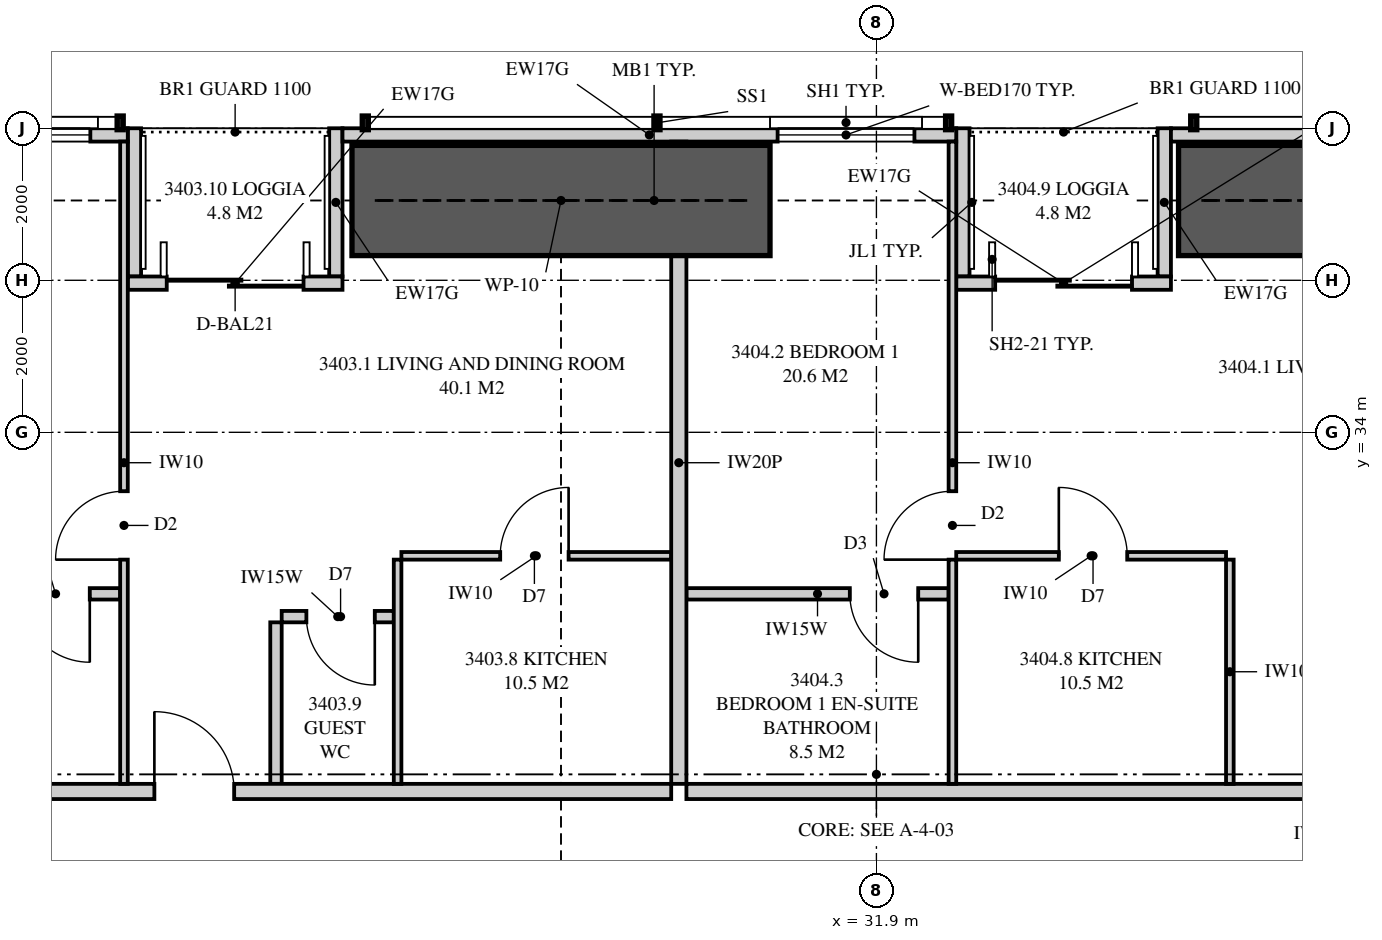
"""IFC4 building model, lengths in metres.
Left out: names, types, materials, properties, quantities, classifications, styles, units other than length and angle.
Written with IfcOpenShell. Run it as: python <this file> out.ifc"""

import sys

from ifc_helpers import new_model, si_unit, direction, frame, frame_2d, origin, place, context, subcontext, project, spatial, polyline, rectangle, outline, extrude, element, fill, save


model = new_model("IFC4")
c1 = context("Model", 3, precision=1e-05, world=origin(), true_north=direction((0.0, 1.0)))
c2 = subcontext(c1, "Body", "Model", "MODEL_VIEW")
j1 = project(units=[si_unit("LENGTHUNIT", "METRE"), si_unit("PLANEANGLEUNIT", "RADIAN")], contexts=[c1])
p1 = place(None, origin())
s1 = spatial("IfcSite", under=j1, at=p1, CompositionType="ELEMENT")
p2 = place(p1, origin())
s2 = spatial("IfcBuilding", under=s1, at=p2, CompositionType="ELEMENT")
p3 = place(p2, frame((0.0, 0.0, 124.95)))
s3 = spatial("IfcBuildingStorey", under=s2, at=p3, CompositionType="ELEMENT", Elevation=124.95)
p4 = place(p3, frame((46.449, 37.913, 0.0), z_axis=(0.0, 0.0, 1.0), x_axis=(-1.0, 0.0, 0.0)))
e1 = element("IfcWall", 1, at=p4, inside=s3, PredefinedType="SOLIDWALL", context=c2, shape_type="SweptSolid", body=[
    extrude(outline(polyline([(0.0, 0.0), (10.674, 0.0), (10.674, 2.15), (7.824, 2.15), (7.824, 3.11), (7.666, 3.11), (7.666, 2.15), (7.62, 2.15), (7.62, 3.11), (0.0, 3.11), (0.0, 0.0)])), frame((0.0, 0.087, 0.0), z_axis=(0.0, -1.0, 0.0), x_axis=(1.0, 0.0, 0.0)), (0.0, 0.0, 1.0), 0.175),
])
p5 = place(p4, frame((2.399, 0.0, 0.4)))
e2 = element("IfcOpeningElement", 2, at=p5, cuts=e1, PredefinedType="OPENING", context=c2, shape_type="SweptSolid", body=[
    extrude(rectangle(XDim=1.8, YDim=1.7, at=frame_2d((0.9, 0.85))), frame((0.0, 0.097, 0.0), z_axis=(0.0, -1.0, 0.0), x_axis=(1.0, 0.0, 0.0)), (0.0, 0.0, 1.0), 0.195),
])
p6 = place(p3, frame((32.95, 37.913, 0.0), z_axis=(0.0, 0.0, 1.0), x_axis=(-1.0, 0.0, 0.0)))
e3 = element("IfcWall", 3, at=p6, inside=s3, PredefinedType="SOLIDWALL", context=c2, shape_type="SweptSolid", body=[
    extrude(rectangle(XDim=8.075, YDim=0.175, at=frame_2d((4.038, 0.0))), origin(), (0.0, 0.0, 1.0), 2.15),
])
p7 = place(p6, frame((0.55, 0.0, 0.4)))
e4 = element("IfcOpeningElement", 4, at=p7, cuts=e3, PredefinedType="OPENING", context=c2, shape_type="SweptSolid", body=[
    extrude(rectangle(XDim=1.8, YDim=1.7, at=frame_2d((0.9, 0.85))), frame((0.0, 0.097, 0.0), z_axis=(0.0, -1.0, 0.0), x_axis=(1.0, 0.0, 0.0)), (0.0, 0.0, 1.0), 0.195),
])
p8 = place(p3, frame((22.05, 37.913, 0.0), z_axis=(0.0, 0.0, 1.0), x_axis=(-1.0, 0.0, 0.0)))
e5 = element("IfcWall", 5, at=p8, inside=s3, PredefinedType="SOLIDWALL", context=c2, shape_type="SweptSolid", body=[
    extrude(outline(polyline([(0.0, 0.0), (12.999, 0.0), (12.999, 3.11), (5.378, 3.11), (5.378, 2.15), (5.333, 2.15), (5.333, 3.11), (5.175, 3.11), (5.175, 2.15), (0.0, 2.15), (0.0, 0.0)])), frame((0.0, 0.087, 0.0), z_axis=(0.0, -1.0, 0.0), x_axis=(1.0, 0.0, 0.0)), (0.0, 0.0, 1.0), 0.175),
])
p9 = place(p8, frame((0.492, 0.0, 0.4)))
e6 = element("IfcOpeningElement", 6, at=p9, cuts=e5, PredefinedType="OPENING", context=c2, shape_type="SweptSolid", body=[
    extrude(rectangle(XDim=1.8, YDim=1.7, at=frame_2d((0.9, 0.85))), frame((0.0, 0.097, 0.0), z_axis=(0.0, -1.0, 0.0), x_axis=(1.0, 0.0, 0.0)), (0.0, 0.0, 1.0), 0.195),
])
p10 = place(p8, frame((8.065, 0.0, 0.4)))
e7 = element("IfcOpeningElement", 7, at=p10, cuts=e5, PredefinedType="OPENING", context=c2, shape_type="SweptSolid", body=[
    extrude(rectangle(XDim=1.8, YDim=1.7, at=frame_2d((0.9, 0.85))), frame((0.0, 0.097, 0.0), z_axis=(0.0, -1.0, 0.0), x_axis=(1.0, 0.0, 0.0)), (0.0, 0.0, 1.0), 0.195),
])
p11 = place(p3, frame((35.775, 35.962, 0.0), z_axis=(0.0, 0.0, 1.0), x_axis=(-1.0, 0.0, 0.0)))
e8 = element("IfcWall", 8, at=p11, inside=s3, PredefinedType="SOLIDWALL", context=c2, shape_type="SweptSolid", body=[
    extrude(rectangle(XDim=2.825, YDim=0.175, at=frame_2d((1.413, 0.0))), origin(), (0.0, 0.0, 1.0), 3.11),
])
p12 = place(p11, frame((0.512, 0.0, 0.0)))
e9 = element("IfcOpeningElement", 9, at=p12, cuts=e8, PredefinedType="OPENING", context=c2, shape_type="SweptSolid", body=[
    extrude(rectangle(XDim=1.8, YDim=2.1, at=frame_2d((0.9, 1.05))), frame((0.0, 0.097, 0.0), z_axis=(0.0, -1.0, 0.0), x_axis=(1.0, 0.0, 0.0)), (0.0, 0.0, 1.0), 0.195),
])
for number, where, z_axis, x_axis in (
    (10, (35.688, 38.0, 0.0), (0.0, 0.0, 1.0), (0.0, -1.0, 0.0)),
    (11, (33.038, 38.0, 0.0), (0.0, 0.0, 1.0), (0.0, -1.0, 0.0)),
):
    element("IfcWall", number, at=place(p3, frame(where, z_axis=z_axis, x_axis=x_axis)), inside=s3, PredefinedType="SOLIDWALL", context=c2, shape_type="SweptSolid", body=[
        extrude(outline(polyline([(0.0, 0.0), (1.95, 0.0), (1.95, 3.11), (1.75, 3.11), (1.75, 2.15), (0.15, 2.15), (0.15, 3.11), (0.0, 3.11), (0.0, 0.0)])), frame((0.0, 0.087, 0.0), z_axis=(0.0, -1.0, 0.0), x_axis=(1.0, 0.0, 0.0)), (0.0, 0.0, 1.0), 0.175),
    ])
p13 = place(p3, frame((24.875, 35.962, 0.0), z_axis=(0.0, 0.0, 1.0), x_axis=(-1.0, 0.0, 0.0)))
e12 = element("IfcWall", 12, at=p13, inside=s3, PredefinedType="SOLIDWALL", context=c2, shape_type="SweptSolid", body=[
    extrude(rectangle(XDim=2.825, YDim=0.175, at=frame_2d((1.413, 0.0))), origin(), (0.0, 0.0, 1.0), 3.11),
])
p14 = place(p13, frame((0.512, 0.0, 0.0)))
e13 = element("IfcOpeningElement", 13, at=p14, cuts=e12, PredefinedType="OPENING", context=c2, shape_type="SweptSolid", body=[
    extrude(rectangle(XDim=1.8, YDim=2.1, at=frame_2d((0.9, 1.05))), frame((0.0, 0.097, 0.0), z_axis=(0.0, -1.0, 0.0), x_axis=(1.0, 0.0, 0.0)), (0.0, 0.0, 1.0), 0.195),
])
for number, where, z_axis, x_axis in (
    (14, (24.788, 38.0, 0.0), (0.0, 0.0, 1.0), (0.0, -1.0, 0.0)),
    (15, (22.137, 38.0, 0.0), (0.0, 0.0, 1.0), (0.0, -1.0, 0.0)),
):
    element("IfcWall", number, at=place(p3, frame(where, z_axis=z_axis, x_axis=x_axis)), inside=s3, PredefinedType="SOLIDWALL", context=c2, shape_type="SweptSolid", body=[
        extrude(outline(polyline([(0.0, 0.0), (1.95, 0.0), (1.95, 3.11), (1.75, 3.11), (1.75, 2.15), (0.15, 2.15), (0.15, 3.11), (0.0, 3.11), (0.0, 0.0)])), frame((0.0, 0.087, 0.0), z_axis=(0.0, -1.0, 0.0), x_axis=(1.0, 0.0, 0.0)), (0.0, 0.0, 1.0), 0.175),
    ])
p15 = place(p3, frame((29.3, 37.825, 0.0), z_axis=(0.0, 0.0, 1.0), x_axis=(0.0, -1.0, 0.0)))
e16 = element("IfcWall", 16, at=p15, inside=s3, PredefinedType="PARTITIONING", context=c2, shape_type="SweptSolid", body=[
    extrude(outline(polyline([(0.529, 2.15), (0.0, 2.15), (0.0, 0.0), (0.529, 0.0), (0.529, 0.444), (1.021, 0.444), (1.021, 0.0), (8.45, 0.0), (8.45, 3.11), (1.685, 3.11), (1.685, 2.15), (1.021, 2.15), (1.021, 1.706), (0.529, 1.706), (0.529, 2.15)])), frame((0.0, 0.1, 0.0), z_axis=(0.0, -1.0, 0.0), x_axis=(1.0, 0.0, 0.0)), (0.0, 0.0, 1.0), 0.2),
])
p16 = place(p3, frame((17.775, 29.275, 0.0), z_axis=(0.0, 0.0, 1.0), x_axis=(1.0, 0.0, 0.0)))
e17 = element("IfcWall", 17, at=p16, inside=s3, PredefinedType="PARTITIONING", context=c2, shape_type="SweptSolid", body=[
    extrude(outline(polyline([(0.0, 0.0), (11.425, 0.0), (11.425, 3.11), (10.312, 3.11), (10.312, 2.541), (9.638, 2.541), (9.638, 3.11), (0.0, 3.11), (0.0, 0.0)])), frame((0.0, 0.1, 0.0), z_axis=(0.0, -1.0, 0.0), x_axis=(1.0, 0.0, 0.0)), (0.0, 0.0, 1.0), 0.2),
])
p17 = place(p16, frame((4.625, 0.0, 0.0)))
e18 = element("IfcOpeningElement", 18, at=p17, cuts=e17, PredefinedType="OPENING", context=c2, shape_type="SweptSolid", body=[
    extrude(rectangle(XDim=1.05, YDim=2.2, at=frame_2d((0.525, 1.1))), frame((0.0, 0.11, 0.0), z_axis=(0.0, -1.0, 0.0), x_axis=(1.0, 0.0, 0.0)), (0.0, 0.0, 1.0), 0.22),
])
p18 = place(p3, frame((22.0, 37.825, 0.0), z_axis=(0.0, 0.0, 1.0), x_axis=(0.0, -1.0, 0.0)))
e19 = element("IfcWall", 19, at=p18, inside=s3, PredefinedType="PARTITIONING", context=c2, shape_type="SweptSolid", body=[
    extrude(outline(polyline([(0.0, 0.0), (8.45, 0.0), (8.45, 3.11), (1.635, 3.11), (1.635, 2.15), (0.0, 2.15), (0.0, 3.11), (0.0, 0.0)])), frame((0.0, 0.05, 0.0), z_axis=(0.0, -1.0, 0.0), x_axis=(1.0, 0.0, 0.0)), (0.0, 0.0, 1.0), 0.1),
])
p19 = place(p18, frame((4.6, 0.0, 0.0)))
e20 = element("IfcOpeningElement", 20, at=p19, cuts=e19, PredefinedType="OPENING", context=c2, shape_type="SweptSolid", body=[
    extrude(rectangle(XDim=0.9, YDim=2.1, at=frame_2d((0.45, 1.05))), frame((0.0, 0.06, 0.0), z_axis=(0.0, -1.0, 0.0), x_axis=(1.0, 0.0, 0.0)), (0.0, 0.0, 1.0), 0.12),
])
p20 = place(p3, frame((17.75, 31.875, 0.0), z_axis=(0.0, 0.0, 1.0), x_axis=(1.0, 0.0, 0.0)))
e21 = element("IfcWall", 21, at=p20, inside=s3, PredefinedType="PLUMBINGWALL", context=c2, shape_type="SweptSolid", body=[
    extrude(rectangle(XDim=4.2, YDim=0.15, at=frame_2d((2.1, 0.0))), origin(), (0.0, 0.0, 1.0), 3.11),
])
p21 = place(p20, frame((2.9, 0.0, 0.0)))
e22 = element("IfcOpeningElement", 22, at=p21, cuts=e21, PredefinedType="OPENING", context=c2, shape_type="SweptSolid", body=[
    extrude(rectangle(XDim=0.9, YDim=2.1, at=frame_2d((0.45, 1.05))), frame((0.0, 0.085, 0.0), z_axis=(0.0, -1.0, 0.0), x_axis=(1.0, 0.0, 0.0)), (0.0, 0.0, 1.0), 0.17),
])
p22 = place(p3, frame((25.65, 32.375, 0.0), z_axis=(0.0, 0.0, 1.0), x_axis=(1.0, 0.0, 0.0)))
e23 = element("IfcWall", 23, at=p22, inside=s3, PredefinedType="PARTITIONING", context=c2, shape_type="SweptSolid", body=[
    extrude(outline(polyline([(0.0, 0.0), (3.55, 0.0), (3.55, 3.11), (2.387, 3.11), (2.387, 2.541), (1.812, 2.541), (1.812, 3.11), (0.0, 3.11), (0.0, 0.0)])), frame((0.0, 0.05, 0.0), z_axis=(0.0, -1.0, 0.0), x_axis=(1.0, 0.0, 0.0)), (0.0, 0.0, 1.0), 0.1),
])
p23 = place(p22, frame((1.3, 0.0, 0.0)))
e24 = element("IfcOpeningElement", 24, at=p23, cuts=e23, PredefinedType="OPENING", context=c2, shape_type="SweptSolid", body=[
    extrude(rectangle(XDim=0.9, YDim=2.1, at=frame_2d((0.45, 1.05))), frame((0.0, 0.06, 0.0), z_axis=(0.0, -1.0, 0.0), x_axis=(1.0, 0.0, 0.0)), (0.0, 0.0, 1.0), 0.12),
])
p24 = place(p3, frame((25.6, 32.325, 0.0), z_axis=(0.0, 0.0, 1.0), x_axis=(0.0, -1.0, 0.0)))
e25 = element("IfcWall", 25, at=p24, inside=s3, PredefinedType="PARTITIONING", context=c2, shape_type="SweptSolid", body=[
    extrude(rectangle(XDim=2.95, YDim=0.1, at=frame_2d((1.475, 0.0))), origin(), (0.0, 0.0, 1.0), 3.11),
])
p25 = place(p3, frame((24.075, 31.575, 0.0), z_axis=(0.0, 0.0, 1.0), x_axis=(1.0, 0.0, 0.0)))
e26 = element("IfcWall", 26, at=p25, inside=s3, PredefinedType="PLUMBINGWALL", context=c2, shape_type="SweptSolid", body=[
    extrude(rectangle(XDim=1.475, YDim=0.15, at=frame_2d((0.738, 0.0))), origin(), (0.0, 0.0, 1.0), 3.11),
])
p26 = place(p25, frame((0.325, 0.0, 0.0)))
e27 = element("IfcOpeningElement", 27, at=p26, cuts=e26, PredefinedType="OPENING", context=c2, shape_type="SweptSolid", body=[
    extrude(rectangle(XDim=0.9, YDim=2.1, at=frame_2d((0.45, 1.05))), frame((0.0, 0.085, 0.0), z_axis=(0.0, -1.0, 0.0), x_axis=(1.0, 0.0, 0.0)), (0.0, 0.0, 1.0), 0.17),
])
p27 = place(p3, frame((24.0, 31.5, 0.0), z_axis=(0.0, 0.0, 1.0), x_axis=(0.0, -1.0, 0.0)))
e28 = element("IfcWall", 28, at=p27, inside=s3, PredefinedType="PLUMBINGWALL", context=c2, shape_type="SweptSolid", body=[
    extrude(rectangle(XDim=2.125, YDim=0.15, at=frame_2d((1.062, 0.0))), origin(), (0.0, 0.0, 1.0), 3.11),
])
p28 = place(p3, frame((29.4, 29.275, 0.0), z_axis=(0.0, 0.0, 1.0), x_axis=(1.0, 0.0, 0.0)))
e29 = element("IfcWall", 29, at=p28, inside=s3, PredefinedType="PARTITIONING", context=c2, shape_type="SweptSolid", body=[
    extrude(rectangle(XDim=8.6, YDim=0.2, at=frame_2d((4.3, 0.0))), origin(), (0.0, 0.0, 1.0), 3.11),
])
p29 = place(p3, frame((32.9, 37.825, 0.0), z_axis=(0.0, 0.0, 1.0), x_axis=(0.0, -1.0, 0.0)))
e30 = element("IfcWall", 30, at=p29, inside=s3, PredefinedType="PARTITIONING", context=c2, shape_type="SweptSolid", body=[
    extrude(outline(polyline([(0.0, 0.0), (8.45, 0.0), (8.45, 3.11), (1.635, 3.11), (1.635, 2.15), (0.0, 2.15), (0.0, 3.11), (0.0, 0.0)])), frame((0.0, 0.05, 0.0), z_axis=(0.0, -1.0, 0.0), x_axis=(1.0, 0.0, 0.0)), (0.0, 0.0, 1.0), 0.1),
])
p30 = place(p29, frame((4.6, 0.0, 0.0)))
e31 = element("IfcOpeningElement", 31, at=p30, cuts=e30, PredefinedType="OPENING", context=c2, shape_type="SweptSolid", body=[
    extrude(rectangle(XDim=0.9, YDim=2.1, at=frame_2d((0.45, 1.05))), frame((0.0, 0.06, 0.0), z_axis=(0.0, -1.0, 0.0), x_axis=(1.0, 0.0, 0.0)), (0.0, 0.0, 1.0), 0.12),
])
p31 = place(p3, frame((29.4, 31.875, 0.0), z_axis=(0.0, 0.0, 1.0), x_axis=(1.0, 0.0, 0.0)))
e32 = element("IfcWall", 32, at=p31, inside=s3, PredefinedType="PLUMBINGWALL", context=c2, shape_type="SweptSolid", body=[
    extrude(rectangle(XDim=3.45, YDim=0.15, at=frame_2d((1.725, 0.0))), origin(), (0.0, 0.0, 1.0), 3.11),
])
p32 = place(p31, frame((2.15, 0.0, 0.0)))
e33 = element("IfcOpeningElement", 33, at=p32, cuts=e32, PredefinedType="OPENING", context=c2, shape_type="SweptSolid", body=[
    extrude(rectangle(XDim=0.9, YDim=2.1, at=frame_2d((0.45, 1.05))), frame((0.0, 0.085, 0.0), z_axis=(0.0, -1.0, 0.0), x_axis=(1.0, 0.0, 0.0)), (0.0, 0.0, 1.0), 0.17),
])
p33 = place(p3, frame((32.95, 32.375, 0.0), z_axis=(0.0, 0.0, 1.0), x_axis=(1.0, 0.0, 0.0)))
e34 = element("IfcWall", 34, at=p33, inside=s3, PredefinedType="PARTITIONING", context=c2, shape_type="SweptSolid", body=[
    extrude(rectangle(XDim=3.55, YDim=0.1, at=frame_2d((1.775, 0.0))), origin(), (0.0, 0.0, 1.0), 3.11),
])
p34 = place(p33, frame((1.35, 0.0, 0.0)))
e35 = element("IfcOpeningElement", 35, at=p34, cuts=e34, PredefinedType="OPENING", context=c2, shape_type="SweptSolid", body=[
    extrude(rectangle(XDim=0.9, YDim=2.1, at=frame_2d((0.45, 1.05))), frame((0.0, 0.06, 0.0), z_axis=(0.0, -1.0, 0.0), x_axis=(1.0, 0.0, 0.0)), (0.0, 0.0, 1.0), 0.12),
])
p35 = place(p3, frame((36.55, 32.325, 0.0), z_axis=(0.0, 0.0, 1.0), x_axis=(0.0, -1.0, 0.0)))
e36 = element("IfcWall", 36, at=p35, inside=s3, PredefinedType="PARTITIONING", context=c2, shape_type="SweptSolid", body=[
    extrude(rectangle(XDim=2.95, YDim=0.1, at=frame_2d((1.475, 0.0))), origin(), (0.0, 0.0, 1.0), 3.11),
])
for number, where, z_axis, x_axis in (
    (37, (35.875, 37.05, 0.0), (0.0, 0.0, 1.0), (1.0, 0.0, 0.0)),
    (38, (25.0, 37.05, 0.0), (0.0, 0.0, 1.0), (1.0, 0.0, 0.0)),
):
    element("IfcWall", number, at=place(p3, frame(where, z_axis=z_axis, x_axis=x_axis)), inside=s3, PredefinedType="SHEAR", context=c2, shape_type="SweptSolid", body=[
        extrude(rectangle(XDim=5.5, YDim=1.45, at=frame_2d((2.75, 0.0))), origin(), (0.0, 0.0, 1.0), 3.35),
    ])
p36 = place(p12, origin())
e39 = element("IfcDoor", 39, at=p36, inside=s3, OperationType="SLIDING_TO_LEFT", PredefinedType="DOOR", context=c2, shape_type="SweptSolid", body=[
    extrude(rectangle(XDim=1.8, YDim=2.1, at=frame_2d((0.9, 1.05))), frame((0.0, 0.025, 0.0), z_axis=(0.0, -1.0, 0.0), x_axis=(1.0, 0.0, 0.0)), (0.0, 0.0, 1.0), 0.05),
])
fill(e9, e39)
p37 = place(p7, origin())
e40 = element("IfcWindow", 40, at=p37, inside=s3, PartitioningType="SINGLE_PANEL", PredefinedType="WINDOW", context=c2, shape_type="SweptSolid", body=[
    extrude(rectangle(XDim=1.8, YDim=1.7, at=frame_2d((0.9, 0.85))), frame((0.0, 0.03, 0.0), z_axis=(0.0, -1.0, 0.0), x_axis=(1.0, 0.0, 0.0)), (0.0, 0.0, 1.0), 0.06),
])
fill(e4, e40)
p38 = place(p14, origin())
e41 = element("IfcDoor", 41, at=p38, inside=s3, OperationType="SLIDING_TO_LEFT", PredefinedType="DOOR", context=c2, shape_type="SweptSolid", body=[
    extrude(rectangle(XDim=1.8, YDim=2.1, at=frame_2d((0.9, 1.05))), frame((0.0, 0.025, 0.0), z_axis=(0.0, -1.0, 0.0), x_axis=(1.0, 0.0, 0.0)), (0.0, 0.0, 1.0), 0.05),
])
fill(e13, e41)
p39 = place(p9, origin())
e42 = element("IfcWindow", 42, at=p39, inside=s3, PartitioningType="SINGLE_PANEL", PredefinedType="WINDOW", context=c2, shape_type="SweptSolid", body=[
    extrude(rectangle(XDim=1.8, YDim=1.7, at=frame_2d((0.9, 0.85))), frame((0.0, 0.03, 0.0), z_axis=(0.0, -1.0, 0.0), x_axis=(1.0, 0.0, 0.0)), (0.0, 0.0, 1.0), 0.06),
])
fill(e6, e42)
p40 = place(p17, origin())
e43 = element("IfcDoor", 43, at=p40, inside=s3, OperationType="SINGLE_SWING_LEFT", PredefinedType="DOOR", context=c2, shape_type="SweptSolid", body=[
    extrude(rectangle(XDim=1.05, YDim=2.2, at=frame_2d((0.525, 1.1))), frame((0.0, 0.025, 0.0), z_axis=(0.0, -1.0, 0.0), x_axis=(1.0, 0.0, 0.0)), (0.0, 0.0, 1.0), 0.05),
])
fill(e18, e43)
p41 = place(p19, frame((0.9, 0.0, 0.0), z_axis=(0.0, 0.0, 1.0), x_axis=(-1.0, 0.0, 0.0)))
e44 = element("IfcDoor", 44, at=p41, inside=s3, OperationType="SINGLE_SWING_LEFT", PredefinedType="DOOR", context=c2, shape_type="SweptSolid", body=[
    extrude(rectangle(XDim=0.9, YDim=2.1, at=frame_2d((0.45, 1.05))), frame((0.0, 0.025, 0.0), z_axis=(0.0, -1.0, 0.0), x_axis=(1.0, 0.0, 0.0)), (0.0, 0.0, 1.0), 0.05),
])
fill(e20, e44)
p42 = place(p21, frame((0.9, 0.0, 0.0), z_axis=(0.0, 0.0, 1.0), x_axis=(-1.0, 0.0, 0.0)))
e45 = element("IfcDoor", 45, at=p42, inside=s3, OperationType="SINGLE_SWING_LEFT", PredefinedType="DOOR", context=c2, shape_type="SweptSolid", body=[
    extrude(rectangle(XDim=0.9, YDim=2.1, at=frame_2d((0.45, 1.05))), frame((0.0, 0.025, 0.0), z_axis=(0.0, -1.0, 0.0), x_axis=(1.0, 0.0, 0.0)), (0.0, 0.0, 1.0), 0.05),
])
fill(e22, e45)
p43 = place(p23, origin())
e46 = element("IfcDoor", 46, at=p43, inside=s3, OperationType="SINGLE_SWING_RIGHT", PredefinedType="DOOR", context=c2, shape_type="SweptSolid", body=[
    extrude(rectangle(XDim=0.9, YDim=2.1, at=frame_2d((0.45, 1.05))), frame((0.0, 0.025, 0.0), z_axis=(0.0, -1.0, 0.0), x_axis=(1.0, 0.0, 0.0)), (0.0, 0.0, 1.0), 0.05),
])
fill(e24, e46)
p44 = place(p26, frame((0.9, 0.0, 0.0), z_axis=(0.0, 0.0, 1.0), x_axis=(-1.0, 0.0, 0.0)))
e47 = element("IfcDoor", 47, at=p44, inside=s3, OperationType="SINGLE_SWING_LEFT", PredefinedType="DOOR", context=c2, shape_type="SweptSolid", body=[
    extrude(rectangle(XDim=0.9, YDim=2.1, at=frame_2d((0.45, 1.05))), frame((0.0, 0.025, 0.0), z_axis=(0.0, -1.0, 0.0), x_axis=(1.0, 0.0, 0.0)), (0.0, 0.0, 1.0), 0.05),
])
fill(e27, e47)
p45 = place(p30, frame((0.9, 0.0, 0.0), z_axis=(0.0, 0.0, 1.0), x_axis=(-1.0, 0.0, 0.0)))
e48 = element("IfcDoor", 48, at=p45, inside=s3, OperationType="SINGLE_SWING_LEFT", PredefinedType="DOOR", context=c2, shape_type="SweptSolid", body=[
    extrude(rectangle(XDim=0.9, YDim=2.1, at=frame_2d((0.45, 1.05))), frame((0.0, 0.025, 0.0), z_axis=(0.0, -1.0, 0.0), x_axis=(1.0, 0.0, 0.0)), (0.0, 0.0, 1.0), 0.05),
])
fill(e31, e48)
p46 = place(p32, frame((0.9, 0.0, 0.0), z_axis=(0.0, 0.0, 1.0), x_axis=(-1.0, 0.0, 0.0)))
e49 = element("IfcDoor", 49, at=p46, inside=s3, OperationType="SINGLE_SWING_LEFT", PredefinedType="DOOR", context=c2, shape_type="SweptSolid", body=[
    extrude(rectangle(XDim=0.9, YDim=2.1, at=frame_2d((0.45, 1.05))), frame((0.0, 0.025, 0.0), z_axis=(0.0, -1.0, 0.0), x_axis=(1.0, 0.0, 0.0)), (0.0, 0.0, 1.0), 0.05),
])
fill(e33, e49)
p47 = place(p34, origin())
e50 = element("IfcDoor", 50, at=p47, inside=s3, OperationType="SINGLE_SWING_LEFT", PredefinedType="DOOR", context=c2, shape_type="SweptSolid", body=[
    extrude(rectangle(XDim=0.9, YDim=2.1, at=frame_2d((0.45, 1.05))), frame((0.0, 0.025, 0.0), z_axis=(0.0, -1.0, 0.0), x_axis=(1.0, 0.0, 0.0)), (0.0, 0.0, 1.0), 0.05),
])
fill(e35, e50)
save(model, sys.argv[1])
